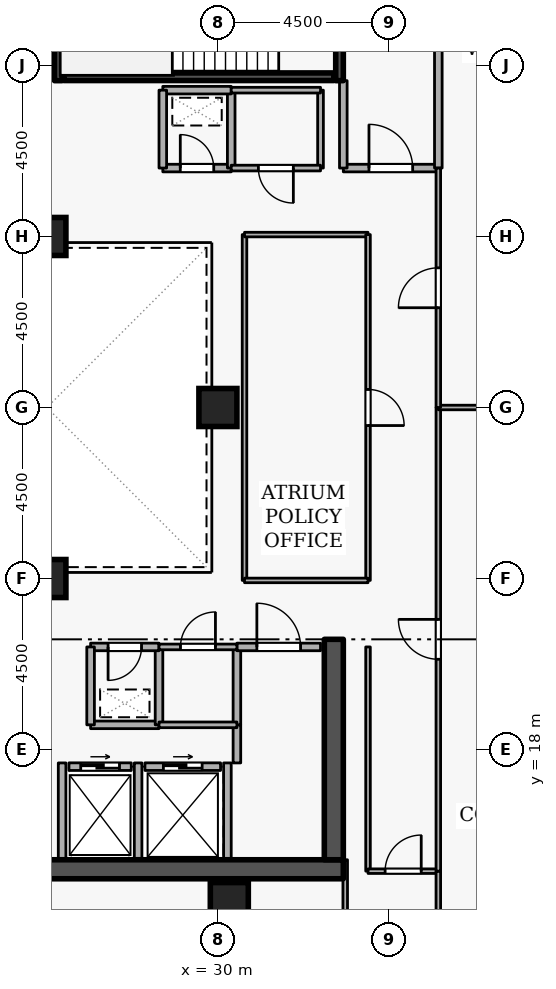
"""IFC4 building model, lengths in metres.
Left out: names, types, materials, properties, quantities, classifications, styles, units other than length and angle.
Written with IfcOpenShell. Run it as: python <this file> out.ifc"""

import sys

from ifc_helpers import new_model, si_unit, direction, frame, frame_2d, origin, origin_2d, place, context, subcontext, project, spatial, rectangle, extrude, element, fill, save


model = new_model("IFC4")
c1 = context("Model", 3, precision=1e-05, world=origin(), true_north=direction((0.0, 1.0)))
c2 = subcontext(c1, "Body", "Model", "MODEL_VIEW")
j1 = project(units=[si_unit("LENGTHUNIT", "METRE"), si_unit("PLANEANGLEUNIT", "RADIAN")], contexts=[c1])
p1 = place(None, origin())
s1 = spatial("IfcSite", under=j1, at=p1, CompositionType="ELEMENT")
p2 = place(p1, origin())
s2 = spatial("IfcBuilding", under=s1, at=p2, CompositionType="ELEMENT")
p3 = place(p2, frame((0.0, 0.0, 233.1)))
s3 = spatial("IfcBuildingStorey", under=s2, at=p3, CompositionType="ELEMENT", Elevation=233.1)
p4 = place(p3, frame((17.7, 14.85, 0.0), z_axis=(0.0, 0.0, 1.0), x_axis=(1.0, 0.0, 0.0)))
e1 = element("IfcWall", 1, at=p4, inside=s3, PredefinedType="SHEAR", context=c2, shape_type="SweptSolid", body=[
    extrude(rectangle(XDim=15.6, YDim=0.5, at=frame_2d((7.8, 0.0))), origin(), (0.0, 0.0, 1.0), 3.6),
])
p5 = place(p3, frame((33.05, 15.1, 0.0), z_axis=(0.0, 0.0, 1.0), x_axis=(0.0, 1.0, 0.0)))
e2 = element("IfcWall", 2, at=p5, inside=s3, PredefinedType="SHEAR", context=c2, shape_type="SweptSolid", body=[
    extrude(rectangle(XDim=5.8, YDim=0.5, at=frame_2d((2.9, 0.0))), origin(), (0.0, 0.0, 1.0), 3.6),
])
for number, where, z_axis, x_axis in (
    (3, (30.3, 14.0, 0.0), (0.0, 0.0, 1.0), (1.0, 0.0, 0.0)),
    (4, (25.5, 22.5, 0.0), (0.0, 0.0, 1.0), (1.0, 0.0, 0.0)),
    (5, (25.5, 31.5, 0.0), (0.0, 0.0, 1.0), (1.0, 0.0, 0.0)),
    (6, (30.0, 27.0, 0.0), (0.0, 0.0, 1.0), (1.0, 0.0, 0.0)),
):
    element("IfcColumn", number, at=place(p3, frame(where, z_axis=z_axis, x_axis=x_axis)), inside=s3, PredefinedType="COLUMN", context=c2, shape_type="SweptSolid", body=[
        extrude(rectangle(XDim=1.0, YDim=1.0, at=origin_2d()), origin(), (0.0, 0.0, 1.0), 3.6),
    ])
p6 = place(p3, frame((26.08, 17.55, 0.0), z_axis=(0.0, 0.0, 1.0), x_axis=(1.0, 0.0, 0.0)))
e7 = element("IfcWall", 7, at=p6, inside=s3, PredefinedType="STANDARD", context=c2, shape_type="SweptSolid", body=[
    extrude(rectangle(XDim=1.64, YDim=0.2, at=frame_2d((0.82, 0.0))), origin(), (0.0, 0.0, 1.0), 3.34),
])
p7 = place(p6, frame((0.31, 0.0, 0.0)))
e8 = element("IfcOpeningElement", 8, at=p7, cuts=e7, PredefinedType="OPENING", context=c2, shape_type="SweptSolid", body=[
    extrude(rectangle(XDim=1.02, YDim=2.06, at=frame_2d((0.51, 1.03))), frame((0.0, 0.11, 0.0), z_axis=(0.0, -1.0, 0.0), x_axis=(1.0, 0.0, 0.0)), (0.0, 0.0, 1.0), 0.22),
])
p8 = place(p3, frame((28.08, 17.55, 0.0), z_axis=(0.0, 0.0, 1.0), x_axis=(1.0, 0.0, 0.0)))
e9 = element("IfcWall", 9, at=p8, inside=s3, PredefinedType="STANDARD", context=c2, shape_type="SweptSolid", body=[
    extrude(rectangle(XDim=1.99, YDim=0.2, at=frame_2d((0.995, 0.0))), origin(), (0.0, 0.0, 1.0), 3.34),
])
p9 = place(p8, frame((0.485, 0.0, 0.0)))
e10 = element("IfcOpeningElement", 10, at=p9, cuts=e9, PredefinedType="OPENING", context=c2, shape_type="SweptSolid", body=[
    extrude(rectangle(XDim=1.02, YDim=2.06, at=frame_2d((0.51, 1.03))), frame((0.0, 0.11, 0.0), z_axis=(0.0, -1.0, 0.0), x_axis=(1.0, 0.0, 0.0)), (0.0, 0.0, 1.0), 0.22),
])
for number, where, z_axis, x_axis in (
    (11, (27.9, 15.112, 0.0), (0.0, 0.0, 1.0), (0.0, 1.0, 0.0)),
    (12, (25.9, 15.112, 0.0), (0.0, 0.0, 1.0), (0.0, 1.0, 0.0)),
    (13, (30.25, 15.112, 0.0), (0.0, 0.0, 1.0), (0.0, 1.0, 0.0)),
):
    element("IfcWall", number, at=place(p3, frame(where, z_axis=z_axis, x_axis=x_axis)), inside=s3, PredefinedType="STANDARD", context=c2, shape_type="SweptSolid", body=[
        extrude(rectangle(XDim=2.536, YDim=0.2, at=frame_2d((1.268, 0.0))), origin(), (0.0, 0.0, 1.0), 3.34),
    ])
p10 = place(p3, frame((33.2, 38.95, 0.0), z_axis=(0.0, 0.0, 1.0), x_axis=(0.0, -1.0, 0.0)))
e14 = element("IfcWall", 14, at=p10, inside=s3, PredefinedType="SHEAR", context=c2, shape_type="SweptSolid", body=[
    extrude(rectangle(XDim=3.35, YDim=0.2, at=frame_2d((1.675, 0.0))), origin(), (0.0, 0.0, 1.0), 3.6),
])
p11 = place(p10, frame((1.125, 0.0, 0.0)))
e15 = element("IfcOpeningElement", 15, at=p11, cuts=e14, PredefinedType="OPENING", context=c2, shape_type="SweptSolid", body=[
    extrude(rectangle(XDim=1.1, YDim=2.1, at=frame_2d((0.55, 1.05))), frame((0.0, 0.11, 0.0), z_axis=(0.0, -1.0, 0.0), x_axis=(1.0, 0.0, 0.0)), (0.0, 0.0, 1.0), 0.22),
])
p12 = place(p3, frame((25.8, 35.6, 0.0), z_axis=(0.0, 0.0, 1.0), x_axis=(0.0, 1.0, 0.0)))
e16 = element("IfcWall", 16, at=p12, inside=s3, PredefinedType="SHEAR", context=c2, shape_type="SweptSolid", body=[
    extrude(rectangle(XDim=3.35, YDim=0.2, at=frame_2d((1.675, 0.0))), origin(), (0.0, 0.0, 1.0), 3.6),
])
p13 = place(p3, frame((25.95, 35.703, 0.0), z_axis=(0.0, 0.0, 1.0), x_axis=(1.0, 0.0, 0.0)))
e17 = element("IfcWall", 17, at=p13, inside=s3, PredefinedType="SHEAR", context=c2, shape_type="SweptSolid", body=[
    extrude(rectangle(XDim=7.1, YDim=0.2, at=frame_2d((3.55, 0.0))), origin(), (0.0, 0.0, 1.0), 3.6),
])
p14 = place(p3, frame((33.3, 33.3, 0.0), z_axis=(0.0, 0.0, 1.0), x_axis=(1.0, 0.0, 0.0)))
e18 = element("IfcWall", 18, at=p14, inside=s3, PredefinedType="STANDARD", context=c2, shape_type="SweptSolid", body=[
    extrude(rectangle(XDim=2.5, YDim=0.2, at=frame_2d((1.25, 0.0))), origin(), (0.0, 0.0, 1.0), 3.34),
])
p15 = place(p14, frame((0.675, 0.0, 0.0)))
e19 = element("IfcOpeningElement", 19, at=p15, cuts=e18, PredefinedType="OPENING", context=c2, shape_type="SweptSolid", body=[
    extrude(rectangle(XDim=1.15, YDim=2.1, at=frame_2d((0.575, 1.05))), frame((0.0, 0.11, 0.0), z_axis=(0.0, -1.0, 0.0), x_axis=(1.0, 0.0, 0.0)), (0.0, 0.0, 1.0), 0.22),
])
p16 = place(p3, frame((35.8, 33.3, 0.0), z_axis=(0.0, 0.0, 1.0), x_axis=(0.0, 1.0, 0.0)))
e20 = element("IfcWall", 20, at=p16, inside=s3, PredefinedType="STANDARD", context=c2, shape_type="SweptSolid", body=[
    extrude(rectangle(XDim=5.7, YDim=0.2, at=frame_2d((2.85, 0.0))), origin(), (0.0, 0.0, 1.0), 3.34),
])
p17 = place(p3, frame((33.3, 35.6, 0.0), z_axis=(0.0, 0.0, 1.0), x_axis=(0.0, -1.0, 0.0)))
e21 = element("IfcWall", 21, at=p17, inside=s3, PredefinedType="STANDARD", context=c2, shape_type="SweptSolid", body=[
    extrude(rectangle(XDim=2.3, YDim=0.2, at=frame_2d((1.15, 0.0))), origin(), (0.0, 0.0, 1.0), 2.545),
])
p18 = place(p3, frame((26.65, 18.65, 0.0), z_axis=(0.0, 0.0, 1.0), x_axis=(1.0, 0.0, 0.0)))
e22 = element("IfcWall", 22, at=p18, inside=s3, PredefinedType="STANDARD", context=c2, shape_type="SweptSolid", body=[
    extrude(rectangle(XDim=1.8, YDim=0.2, at=frame_2d((0.9, 0.0))), origin(), (0.0, 0.0, 1.0), 3.34),
])
p19 = place(p3, frame((28.45, 18.65, 0.0), z_axis=(0.0, 0.0, 1.0), x_axis=(0.0, 1.0, 0.0)))
e23 = element("IfcWall", 23, at=p19, inside=s3, PredefinedType="STANDARD", context=c2, shape_type="SweptSolid", body=[
    extrude(rectangle(XDim=2.05, YDim=0.2, at=frame_2d((1.025, 0.0))), origin(), (0.0, 0.0, 1.0), 3.34),
])
p20 = place(p3, frame((28.45, 20.7, 0.0), z_axis=(0.0, 0.0, 1.0), x_axis=(-1.0, 0.0, 0.0)))
e24 = element("IfcWall", 24, at=p20, inside=s3, PredefinedType="STANDARD", context=c2, shape_type="SweptSolid", body=[
    extrude(rectangle(XDim=1.8, YDim=0.2, at=frame_2d((0.9, 0.0))), origin(), (0.0, 0.0, 1.0), 3.34),
])
p21 = place(p20, frame((0.46, 0.0, 0.0)))
e25 = element("IfcOpeningElement", 25, at=p21, cuts=e24, PredefinedType="OPENING", context=c2, shape_type="SweptSolid", body=[
    extrude(rectangle(XDim=0.88, YDim=2.04, at=frame_2d((0.44, 1.02))), frame((0.0, 0.11, 0.0), z_axis=(0.0, -1.0, 0.0), x_axis=(1.0, 0.0, 0.0)), (0.0, 0.0, 1.0), 0.22),
])
p22 = place(p3, frame((26.65, 20.7, 0.0), z_axis=(0.0, 0.0, 1.0), x_axis=(0.0, -1.0, 0.0)))
e26 = element("IfcWall", 26, at=p22, inside=s3, PredefinedType="STANDARD", context=c2, shape_type="SweptSolid", body=[
    extrude(rectangle(XDim=2.05, YDim=0.2, at=frame_2d((1.025, 0.0))), origin(), (0.0, 0.0, 1.0), 3.34),
])
p23 = place(p3, frame((28.55, 33.3, 0.0), z_axis=(0.0, 0.0, 1.0), x_axis=(1.0, 0.0, 0.0)))
e27 = element("IfcWall", 27, at=p23, inside=s3, PredefinedType="STANDARD", context=c2, shape_type="SweptSolid", body=[
    extrude(rectangle(XDim=1.8, YDim=0.2, at=frame_2d((0.9, 0.0))), origin(), (0.0, 0.0, 1.0), 3.34),
])
p24 = place(p23, frame((0.46, 0.0, 0.0)))
e28 = element("IfcOpeningElement", 28, at=p24, cuts=e27, PredefinedType="OPENING", context=c2, shape_type="SweptSolid", body=[
    extrude(rectangle(XDim=0.88, YDim=2.04, at=frame_2d((0.44, 1.02))), frame((0.0, 0.11, 0.0), z_axis=(0.0, -1.0, 0.0), x_axis=(1.0, 0.0, 0.0)), (0.0, 0.0, 1.0), 0.22),
])
p25 = place(p3, frame((30.35, 33.3, 0.0), z_axis=(0.0, 0.0, 1.0), x_axis=(0.0, 1.0, 0.0)))
e29 = element("IfcWall", 29, at=p25, inside=s3, PredefinedType="STANDARD", context=c2, shape_type="SweptSolid", body=[
    extrude(rectangle(XDim=2.05, YDim=0.2, at=frame_2d((1.025, 0.0))), origin(), (0.0, 0.0, 1.0), 3.34),
])
p26 = place(p3, frame((30.35, 35.35, 0.0), z_axis=(0.0, 0.0, 1.0), x_axis=(-1.0, 0.0, 0.0)))
e30 = element("IfcWall", 30, at=p26, inside=s3, PredefinedType="STANDARD", context=c2, shape_type="SweptSolid", body=[
    extrude(rectangle(XDim=1.8, YDim=0.2, at=frame_2d((0.9, 0.0))), origin(), (0.0, 0.0, 1.0), 3.34),
])
p27 = place(p3, frame((28.55, 35.35, 0.0), z_axis=(0.0, 0.0, 1.0), x_axis=(0.0, -1.0, 0.0)))
e31 = element("IfcWall", 31, at=p27, inside=s3, PredefinedType="STANDARD", context=c2, shape_type="SweptSolid", body=[
    extrude(rectangle(XDim=2.05, YDim=0.2, at=frame_2d((1.025, 0.0))), origin(), (0.0, 0.0, 1.0), 3.34),
])
p28 = place(p3, frame((30.5, 17.648, 0.0), z_axis=(0.0, 0.0, 1.0), x_axis=(0.0, 1.0, 0.0)))
e32 = element("IfcWall", 32, at=p28, inside=s3, PredefinedType="STANDARD", context=c2, shape_type="SweptSolid", body=[
    extrude(rectangle(XDim=1.002, YDim=0.2, at=frame_2d((0.501, 0.0))), origin(), (0.0, 0.0, 1.0), 3.34),
])
p29 = place(p3, frame((30.5, 18.65, 0.0), z_axis=(0.0, 0.0, 1.0), x_axis=(0.0, 1.0, 0.0)))
e33 = element("IfcWall", 33, at=p29, inside=s3, PredefinedType="STANDARD", context=c2, shape_type="SweptSolid", body=[
    extrude(rectangle(XDim=2.05, YDim=0.2, at=frame_2d((1.025, 0.0))), origin(), (0.0, 0.0, 1.0), 3.34),
])
p30 = place(p3, frame((30.5, 20.7, 0.0), z_axis=(0.0, 0.0, 1.0), x_axis=(1.0, 0.0, 0.0)))
e34 = element("IfcWall", 34, at=p30, inside=s3, PredefinedType="STANDARD", context=c2, shape_type="SweptSolid", body=[
    extrude(rectangle(XDim=2.2, YDim=0.2, at=frame_2d((1.1, 0.0))), origin(), (0.0, 0.0, 1.0), 3.34),
])
p31 = place(p30, frame((0.525, 0.0, 0.0)))
e35 = element("IfcOpeningElement", 35, at=p31, cuts=e34, PredefinedType="OPENING", context=c2, shape_type="SweptSolid", body=[
    extrude(rectangle(XDim=1.15, YDim=2.1, at=frame_2d((0.575, 1.05))), frame((0.0, 0.11, 0.0), z_axis=(0.0, -1.0, 0.0), x_axis=(1.0, 0.0, 0.0)), (0.0, 0.0, 1.0), 0.22),
])
p32 = place(p3, frame((30.5, 18.65, 0.0), z_axis=(0.0, 0.0, 1.0), x_axis=(-1.0, 0.0, 0.0)))
e36 = element("IfcWall", 36, at=p32, inside=s3, PredefinedType="PARTITIONING", context=c2, shape_type="SweptSolid", body=[
    extrude(rectangle(XDim=2.05, YDim=0.15, at=frame_2d((1.025, 0.0))), origin(), (0.0, 0.0, 1.0), 3.34),
])
p33 = place(p3, frame((28.45, 20.7, 0.0), z_axis=(0.0, 0.0, 1.0), x_axis=(1.0, 0.0, 0.0)))
e37 = element("IfcWall", 37, at=p33, inside=s3, PredefinedType="PARTITIONING", context=c2, shape_type="SweptSolid", body=[
    extrude(rectangle(XDim=2.05, YDim=0.15, at=frame_2d((1.025, 0.0))), origin(), (0.0, 0.0, 1.0), 3.34),
])
p34 = place(p33, frame((0.565, 0.0, 0.0)))
e38 = element("IfcOpeningElement", 38, at=p34, cuts=e37, PredefinedType="OPENING", context=c2, shape_type="SweptSolid", body=[
    extrude(rectangle(XDim=0.92, YDim=2.08, at=frame_2d((0.46, 1.04))), frame((0.0, 0.085, 0.0), z_axis=(0.0, -1.0, 0.0), x_axis=(1.0, 0.0, 0.0)), (0.0, 0.0, 1.0), 0.17),
])
p35 = place(p3, frame((32.7, 35.35, 0.0), z_axis=(0.0, 0.0, 1.0), x_axis=(0.0, -1.0, 0.0)))
e39 = element("IfcWall", 39, at=p35, inside=s3, PredefinedType="PARTITIONING", context=c2, shape_type="SweptSolid", body=[
    extrude(rectangle(XDim=2.05, YDim=0.15, at=frame_2d((1.025, 0.0))), origin(), (0.0, 0.0, 1.0), 2.545),
])
p36 = place(p3, frame((32.7, 33.3, 0.0), z_axis=(0.0, 0.0, 1.0), x_axis=(-1.0, 0.0, 0.0)))
e40 = element("IfcWall", 40, at=p36, inside=s3, PredefinedType="PARTITIONING", context=c2, shape_type="SweptSolid", body=[
    extrude(rectangle(XDim=2.35, YDim=0.15, at=frame_2d((1.175, 0.0))), origin(), (0.0, 0.0, 1.0), 3.34),
])
p37 = place(p36, frame((0.715, 0.0, 0.0)))
e41 = element("IfcOpeningElement", 41, at=p37, cuts=e40, PredefinedType="OPENING", context=c2, shape_type="SweptSolid", body=[
    extrude(rectangle(XDim=0.92, YDim=2.08, at=frame_2d((0.46, 1.04))), frame((0.0, 0.085, 0.0), z_axis=(0.0, -1.0, 0.0), x_axis=(1.0, 0.0, 0.0)), (0.0, 0.0, 1.0), 0.17),
])
p38 = place(p3, frame((30.35, 35.35, 0.0), z_axis=(0.0, 0.0, 1.0), x_axis=(1.0, 0.0, 0.0)))
e42 = element("IfcWall", 42, at=p38, inside=s3, PredefinedType="PARTITIONING", context=c2, shape_type="SweptSolid", body=[
    extrude(rectangle(XDim=2.35, YDim=0.15, at=frame_2d((1.175, 0.0))), origin(), (0.0, 0.0, 1.0), 3.34),
])
p39 = place(p3, frame((33.95, 20.7, 0.0), z_axis=(0.0, 0.0, 1.0), x_axis=(0.0, -1.0, 0.0)))
e43 = element("IfcWall", 43, at=p39, inside=s3, PredefinedType="PARTITIONING", context=c2, shape_type="SweptSolid", body=[
    extrude(rectangle(XDim=5.9, YDim=0.12, at=frame_2d((2.95, 0.0))), origin(), (0.0, 0.0, 1.0), 3.34),
])
p40 = place(p3, frame((33.95, 14.8, 0.0), z_axis=(0.0, 0.0, 1.0), x_axis=(1.0, 0.0, 0.0)))
e44 = element("IfcWall", 44, at=p40, inside=s3, PredefinedType="PARTITIONING", context=c2, shape_type="SweptSolid", body=[
    extrude(rectangle(XDim=1.85, YDim=0.12, at=frame_2d((0.925, 0.0))), origin(), (0.0, 0.0, 1.0), 3.34),
])
p41 = place(p40, frame((0.45, 0.0, 0.0)))
e45 = element("IfcOpeningElement", 45, at=p41, cuts=e44, PredefinedType="OPENING", context=c2, shape_type="SweptSolid", body=[
    extrude(rectangle(XDim=0.95, YDim=2.1, at=frame_2d((0.475, 1.05))), frame((0.0, 0.07, 0.0), z_axis=(0.0, -1.0, 0.0), x_axis=(1.0, 0.0, 0.0)), (0.0, 0.0, 1.0), 0.14),
])
p42 = place(p3, frame((35.8, 14.8, 0.0), z_axis=(0.0, 0.0, 1.0), x_axis=(0.0, -1.0, 0.0)))
e46 = element("IfcWall", 46, at=p42, inside=s3, PredefinedType="PARTITIONING", context=c2, shape_type="SweptSolid", body=[
    extrude(rectangle(XDim=11.52, YDim=0.12, at=frame_2d((5.76, 0.0))), origin(), (0.0, 0.0, 1.0), 3.34),
])
p43 = place(p3, frame((33.35, 3.28, 0.0), z_axis=(0.0, 0.0, 1.0), x_axis=(0.0, 1.0, 0.0)))
e47 = element("IfcWall", 47, at=p43, inside=s3, PredefinedType="PARTITIONING", context=c2, shape_type="SweptSolid", body=[
    extrude(rectangle(XDim=11.82, YDim=0.12, at=frame_2d((5.91, 0.0))), origin(), (0.0, 0.0, 1.0), 2.545),
])
p44 = place(p3, frame((35.8, 14.8, 0.0), z_axis=(0.0, 0.0, 1.0), x_axis=(0.0, 1.0, 0.0)))
e48 = element("IfcWall", 48, at=p44, inside=s3, PredefinedType="PARTITIONING", context=c2, shape_type="SweptSolid", body=[
    extrude(rectangle(XDim=12.2, YDim=0.12, at=frame_2d((6.1, 0.0))), origin(), (0.0, 0.0, 1.0), 3.34),
])
p45 = place(p44, frame((5.575, 0.0, 0.0)))
e49 = element("IfcOpeningElement", 49, at=p45, cuts=e48, PredefinedType="OPENING", context=c2, shape_type="SweptSolid", body=[
    extrude(rectangle(XDim=1.05, YDim=2.1, at=frame_2d((0.525, 1.05))), frame((0.0, 0.07, 0.0), z_axis=(0.0, -1.0, 0.0), x_axis=(1.0, 0.0, 0.0)), (0.0, 0.0, 1.0), 0.14),
])
p46 = place(p3, frame((35.8, 27.0, 0.0), z_axis=(0.0, 0.0, 1.0), x_axis=(1.0, 0.0, 0.0)))
e50 = element("IfcWall", 50, at=p46, inside=s3, PredefinedType="PARTITIONING", context=c2, shape_type="SweptSolid", body=[
    extrude(rectangle(XDim=7.42, YDim=0.12, at=frame_2d((3.71, 0.0))), origin(), (0.0, 0.0, 1.0), 2.932),
])
p47 = place(p3, frame((35.8, 27.0, 0.0), z_axis=(0.0, 0.0, 1.0), x_axis=(0.0, 1.0, 0.0)))
e51 = element("IfcWall", 51, at=p47, inside=s3, PredefinedType="PARTITIONING", context=c2, shape_type="SweptSolid", body=[
    extrude(rectangle(XDim=6.3, YDim=0.12, at=frame_2d((3.15, 0.0))), origin(), (0.0, 0.0, 1.0), 3.34),
])
p48 = place(p47, frame((2.625, 0.0, 0.0)))
e52 = element("IfcOpeningElement", 52, at=p48, cuts=e51, PredefinedType="OPENING", context=c2, shape_type="SweptSolid", body=[
    extrude(rectangle(XDim=1.05, YDim=2.1, at=frame_2d((0.525, 1.05))), frame((0.0, 0.07, 0.0), z_axis=(0.0, -1.0, 0.0), x_axis=(1.0, 0.0, 0.0)), (0.0, 0.0, 1.0), 0.14),
])
p49 = place(p3, frame((30.7, 22.45, 0.0), z_axis=(0.0, 0.0, 1.0), x_axis=(0.0, 1.0, 0.0)))
e53 = element("IfcWall", 53, at=p49, inside=s3, PredefinedType="PARTITIONING", context=c2, shape_type="SweptSolid", body=[
    extrude(rectangle(XDim=9.1, YDim=0.12, at=frame_2d((4.55, 0.0))), origin(), (0.0, 0.0, 1.0), 3.34),
])
p50 = place(p3, frame((30.7, 31.55, 0.0), z_axis=(0.0, 0.0, 1.0), x_axis=(1.0, 0.0, 0.0)))
e54 = element("IfcWall", 54, at=p50, inside=s3, PredefinedType="PARTITIONING", context=c2, shape_type="SweptSolid", body=[
    extrude(rectangle(XDim=3.25, YDim=0.12, at=frame_2d((1.625, 0.0))), origin(), (0.0, 0.0, 1.0), 3.34),
])
p51 = place(p3, frame((33.95, 31.55, 0.0), z_axis=(0.0, 0.0, 1.0), x_axis=(0.0, -1.0, 0.0)))
e55 = element("IfcWall", 55, at=p51, inside=s3, PredefinedType="PARTITIONING", context=c2, shape_type="SweptSolid", body=[
    extrude(rectangle(XDim=9.1, YDim=0.12, at=frame_2d((4.55, 0.0))), origin(), (0.0, 0.0, 1.0), 3.34),
])
p52 = place(p51, frame((4.075, 0.0, 0.0)))
e56 = element("IfcOpeningElement", 56, at=p52, cuts=e55, PredefinedType="OPENING", context=c2, shape_type="SweptSolid", body=[
    extrude(rectangle(XDim=0.95, YDim=2.1, at=frame_2d((0.475, 1.05))), frame((0.0, 0.07, 0.0), z_axis=(0.0, -1.0, 0.0), x_axis=(1.0, 0.0, 0.0)), (0.0, 0.0, 1.0), 0.14),
])
p53 = place(p3, frame((33.95, 22.45, 0.0), z_axis=(0.0, 0.0, 1.0), x_axis=(-1.0, 0.0, 0.0)))
e57 = element("IfcWall", 57, at=p53, inside=s3, PredefinedType="PARTITIONING", context=c2, shape_type="SweptSolid", body=[
    extrude(rectangle(XDim=3.25, YDim=0.12, at=frame_2d((1.625, 0.0))), origin(), (0.0, 0.0, 1.0), 3.34),
])
p54 = place(p7, origin())
e58 = element("IfcDoor", 58, at=p54, inside=s3, OperationType="SLIDING_TO_LEFT", PredefinedType="DOOR", context=c2, shape_type="SweptSolid", body=[
    extrude(rectangle(XDim=1.02, YDim=2.06, at=frame_2d((0.51, 1.03))), frame((0.0, 0.025, 0.0), z_axis=(0.0, -1.0, 0.0), x_axis=(1.0, 0.0, 0.0)), (0.0, 0.0, 1.0), 0.05),
])
fill(e8, e58)
p55 = place(p9, origin())
e59 = element("IfcDoor", 59, at=p55, inside=s3, OperationType="SLIDING_TO_LEFT", PredefinedType="DOOR", context=c2, shape_type="SweptSolid", body=[
    extrude(rectangle(XDim=1.02, YDim=2.06, at=frame_2d((0.51, 1.03))), frame((0.0, 0.025, 0.0), z_axis=(0.0, -1.0, 0.0), x_axis=(1.0, 0.0, 0.0)), (0.0, 0.0, 1.0), 0.05),
])
fill(e10, e59)
p56 = place(p15, origin())
e60 = element("IfcDoor", 60, at=p56, inside=s3, OperationType="SINGLE_SWING_LEFT", PredefinedType="DOOR", context=c2, shape_type="SweptSolid", body=[
    extrude(rectangle(XDim=1.15, YDim=2.1, at=frame_2d((0.575, 1.05))), frame((0.0, 0.025, 0.0), z_axis=(0.0, -1.0, 0.0), x_axis=(1.0, 0.0, 0.0)), (0.0, 0.0, 1.0), 0.05),
])
fill(e19, e60)
p57 = place(p21, origin())
e61 = element("IfcDoor", 61, at=p57, inside=s3, OperationType="SINGLE_SWING_RIGHT", PredefinedType="DOOR", context=c2, shape_type="SweptSolid", body=[
    extrude(rectangle(XDim=0.88, YDim=2.04, at=frame_2d((0.44, 1.02))), frame((0.0, 0.025, 0.0), z_axis=(0.0, -1.0, 0.0), x_axis=(1.0, 0.0, 0.0)), (0.0, 0.0, 1.0), 0.05),
])
fill(e25, e61)
p58 = place(p24, origin())
e62 = element("IfcDoor", 62, at=p58, inside=s3, OperationType="SINGLE_SWING_LEFT", PredefinedType="DOOR", context=c2, shape_type="SweptSolid", body=[
    extrude(rectangle(XDim=0.88, YDim=2.04, at=frame_2d((0.44, 1.02))), frame((0.0, 0.025, 0.0), z_axis=(0.0, -1.0, 0.0), x_axis=(1.0, 0.0, 0.0)), (0.0, 0.0, 1.0), 0.05),
])
fill(e28, e62)
p59 = place(p34, origin())
e63 = element("IfcDoor", 63, at=p59, inside=s3, OperationType="SINGLE_SWING_RIGHT", PredefinedType="DOOR", context=c2, shape_type="SweptSolid", body=[
    extrude(rectangle(XDim=0.92, YDim=2.08, at=frame_2d((0.46, 1.04))), frame((0.0, 0.025, 0.0), z_axis=(0.0, -1.0, 0.0), x_axis=(1.0, 0.0, 0.0)), (0.0, 0.0, 1.0), 0.05),
])
fill(e38, e63)
p60 = place(p31, origin())
e64 = element("IfcDoor", 64, at=p60, inside=s3, OperationType="SINGLE_SWING_LEFT", PredefinedType="DOOR", context=c2, shape_type="SweptSolid", body=[
    extrude(rectangle(XDim=1.15, YDim=2.1, at=frame_2d((0.575, 1.05))), frame((0.0, 0.025, 0.0), z_axis=(0.0, -1.0, 0.0), x_axis=(1.0, 0.0, 0.0)), (0.0, 0.0, 1.0), 0.05),
])
fill(e35, e64)
p61 = place(p37, origin())
e65 = element("IfcDoor", 65, at=p61, inside=s3, OperationType="SINGLE_SWING_LEFT", PredefinedType="DOOR", context=c2, shape_type="SweptSolid", body=[
    extrude(rectangle(XDim=0.92, YDim=2.08, at=frame_2d((0.46, 1.04))), frame((0.0, 0.025, 0.0), z_axis=(0.0, -1.0, 0.0), x_axis=(1.0, 0.0, 0.0)), (0.0, 0.0, 1.0), 0.05),
])
fill(e41, e65)
p62 = place(p41, origin())
e66 = element("IfcDoor", 66, at=p62, inside=s3, OperationType="SINGLE_SWING_RIGHT", PredefinedType="DOOR", context=c2, shape_type="SweptSolid", body=[
    extrude(rectangle(XDim=0.95, YDim=2.1, at=frame_2d((0.475, 1.05))), frame((0.0, 0.025, 0.0), z_axis=(0.0, -1.0, 0.0), x_axis=(1.0, 0.0, 0.0)), (0.0, 0.0, 1.0), 0.05),
])
fill(e45, e66)
p63 = place(p45, origin())
e67 = element("IfcDoor", 67, at=p63, inside=s3, OperationType="SINGLE_SWING_RIGHT", PredefinedType="DOOR", context=c2, shape_type="SweptSolid", body=[
    extrude(rectangle(XDim=1.05, YDim=2.1, at=frame_2d((0.525, 1.05))), frame((0.0, 0.025, 0.0), z_axis=(0.0, -1.0, 0.0), x_axis=(1.0, 0.0, 0.0)), (0.0, 0.0, 1.0), 0.05),
])
fill(e49, e67)
p64 = place(p48, origin())
e68 = element("IfcDoor", 68, at=p64, inside=s3, OperationType="SINGLE_SWING_LEFT", PredefinedType="DOOR", context=c2, shape_type="SweptSolid", body=[
    extrude(rectangle(XDim=1.05, YDim=2.1, at=frame_2d((0.525, 1.05))), frame((0.0, 0.025, 0.0), z_axis=(0.0, -1.0, 0.0), x_axis=(1.0, 0.0, 0.0)), (0.0, 0.0, 1.0), 0.05),
])
fill(e52, e68)
p65 = place(p52, origin())
e69 = element("IfcDoor", 69, at=p65, inside=s3, OperationType="SINGLE_SWING_RIGHT", PredefinedType="DOOR", context=c2, shape_type="SweptSolid", body=[
    extrude(rectangle(XDim=0.95, YDim=2.1, at=frame_2d((0.475, 1.05))), frame((0.0, 0.025, 0.0), z_axis=(0.0, -1.0, 0.0), x_axis=(1.0, 0.0, 0.0)), (0.0, 0.0, 1.0), 0.05),
])
fill(e56, e69)
save(model, sys.argv[1])
